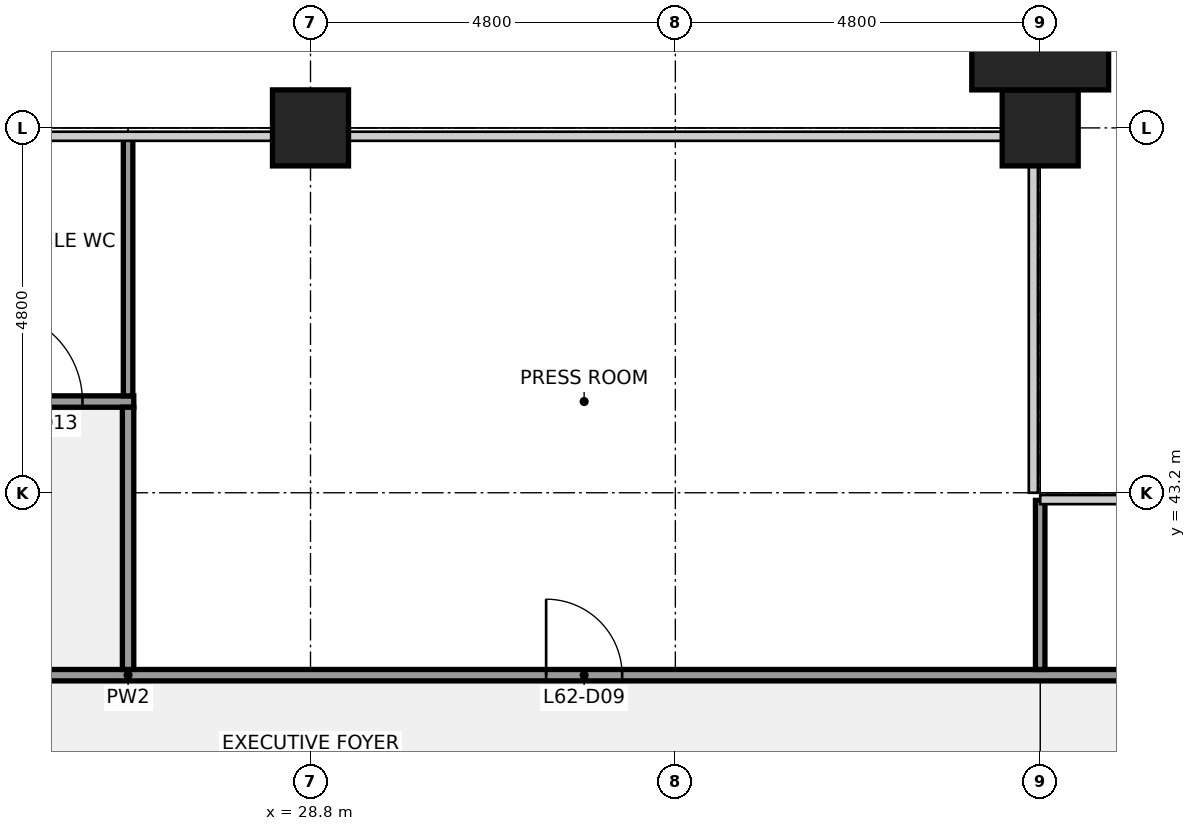
"""IFC4 building model, lengths in metres.
Left out: names, types, materials, properties, quantities, classifications, styles, units other than length and angle.
Written with IfcOpenShell. Run it as: python <this file> out.ifc"""

import sys

from ifc_helpers import new_model, si_unit, direction, frame, frame_2d, origin, origin_2d, place, context, subcontext, project, spatial, rectangle, extrude, element, fill, save


model = new_model("IFC4")
c1 = context("Model", 3, precision=1e-05, world=origin(), true_north=direction((0.0, 1.0)))
c2 = subcontext(c1, "Body", "Model", "MODEL_VIEW")
j1 = project(units=[si_unit("LENGTHUNIT", "METRE"), si_unit("PLANEANGLEUNIT", "RADIAN")], contexts=[c1])
p1 = place(None, origin())
s1 = spatial("IfcSite", under=j1, at=p1, CompositionType="ELEMENT")
p2 = place(p1, origin())
s2 = spatial("IfcBuilding", under=s1, at=p2, CompositionType="ELEMENT")
p3 = place(p2, frame((0.0, 0.0, 286.3)))
s3 = spatial("IfcBuildingStorey", under=s2, at=p3, CompositionType="ELEMENT", Elevation=286.3)
for number, where, z_axis, x_axis in (
    (1, (28.8, 48.0, 0.0), (0.0, 0.0, 1.0), (1.0, 0.0, 0.0)),
    (2, (38.4, 48.0, 0.0), (0.0, 0.0, 1.0), (1.0, 0.0, 0.0)),
):
    element("IfcColumn", number, at=place(p3, frame(where, z_axis=z_axis, x_axis=x_axis)), inside=s3, PredefinedType="COLUMN", context=c2, shape_type="SweptSolid", body=[
        extrude(rectangle(XDim=1.0, YDim=1.0, at=origin_2d()), origin(), (0.0, 0.0, 1.0), 4.0),
    ])
p4 = place(p3, frame((9.7, 40.8, 0.0), z_axis=(0.0, 0.0, 1.0), x_axis=(1.0, 0.0, 0.0)))
e3 = element("IfcWall", 3, at=p4, inside=s3, PredefinedType="PARTITIONING", context=c2, shape_type="SweptSolid", body=[
    extrude(rectangle(XDim=33.4, YDim=0.15, at=frame_2d((16.7, 0.0))), origin(), (0.0, 0.0, 1.0), 2.849),
])
p5 = place(p4, frame((4.25, 0.0, 0.0)))
e4 = element("IfcOpeningElement", 4, at=p5, cuts=e3, PredefinedType="OPENING", context=c2, shape_type="SweptSolid", body=[
    extrude(rectangle(XDim=1.0, YDim=2.1, at=frame_2d((0.5, 1.05))), frame((0.0, 0.085, 0.0), z_axis=(0.0, -1.0, 0.0), x_axis=(1.0, 0.0, 0.0)), (0.0, 0.0, 1.0), 0.17),
])
p6 = place(p4, frame((12.6, 0.0, 0.0)))
e5 = element("IfcOpeningElement", 5, at=p6, cuts=e3, PredefinedType="OPENING", context=c2, shape_type="SweptSolid", body=[
    extrude(rectangle(XDim=1.0, YDim=2.1, at=frame_2d((0.5, 1.05))), frame((0.0, 0.085, 0.0), z_axis=(0.0, -1.0, 0.0), x_axis=(1.0, 0.0, 0.0)), (0.0, 0.0, 1.0), 0.17),
])
p7 = place(p4, frame((22.2, 0.0, 0.0)))
e6 = element("IfcOpeningElement", 6, at=p7, cuts=e3, PredefinedType="OPENING", context=c2, shape_type="SweptSolid", body=[
    extrude(rectangle(XDim=1.0, YDim=2.1, at=frame_2d((0.5, 1.05))), frame((0.0, 0.085, 0.0), z_axis=(0.0, -1.0, 0.0), x_axis=(1.0, 0.0, 0.0)), (0.0, 0.0, 1.0), 0.17),
])
p8 = place(p4, frame((30.55, 0.0, 0.0)))
e7 = element("IfcOpeningElement", 7, at=p8, cuts=e3, PredefinedType="OPENING", context=c2, shape_type="SweptSolid", body=[
    extrude(rectangle(XDim=1.0, YDim=2.1, at=frame_2d((0.5, 1.05))), frame((0.0, 0.085, 0.0), z_axis=(0.0, -1.0, 0.0), x_axis=(1.0, 0.0, 0.0)), (0.0, 0.0, 1.0), 0.17),
])
p9 = place(p3, frame((19.3, 44.4, 0.0), z_axis=(0.0, 0.0, 1.0), x_axis=(1.0, 0.0, 0.0)))
e8 = element("IfcWall", 8, at=p9, inside=s3, PredefinedType="PARTITIONING", context=c2, shape_type="SweptSolid", body=[
    extrude(rectangle(XDim=7.175, YDim=0.15, at=frame_2d((3.587, 0.0))), origin(), (0.0, 0.0, 1.0), 2.849),
])
p10 = place(p9, frame((0.7, 0.0, 0.0)))
e9 = element("IfcOpeningElement", 9, at=p10, cuts=e8, PredefinedType="OPENING", context=c2, shape_type="SweptSolid", body=[
    extrude(rectangle(XDim=0.9, YDim=2.1, at=frame_2d((0.45, 1.05))), frame((0.0, 0.085, 0.0), z_axis=(0.0, -1.0, 0.0), x_axis=(1.0, 0.0, 0.0)), (0.0, 0.0, 1.0), 0.17),
])
p11 = place(p9, frame((3.05, 0.0, 0.0)))
e10 = element("IfcOpeningElement", 10, at=p11, cuts=e8, PredefinedType="OPENING", context=c2, shape_type="SweptSolid", body=[
    extrude(rectangle(XDim=0.9, YDim=2.1, at=frame_2d((0.45, 1.05))), frame((0.0, 0.085, 0.0), z_axis=(0.0, -1.0, 0.0), x_axis=(1.0, 0.0, 0.0)), (0.0, 0.0, 1.0), 0.17),
])
p12 = place(p9, frame((5.3, 0.0, 0.0)))
e11 = element("IfcOpeningElement", 11, at=p12, cuts=e8, PredefinedType="OPENING", context=c2, shape_type="SweptSolid", body=[
    extrude(rectangle(XDim=1.2, YDim=2.1, at=frame_2d((0.6, 1.05))), frame((0.0, 0.085, 0.0), z_axis=(0.0, -1.0, 0.0), x_axis=(1.0, 0.0, 0.0)), (0.0, 0.0, 1.0), 0.17),
])
p13 = place(p3, frame((26.4, 44.475, 0.0), z_axis=(0.0, 0.0, 1.0), x_axis=(0.0, 1.0, 0.0)))
e12 = element("IfcWall", 12, at=p13, inside=s3, PredefinedType="PARTITIONING", context=c2, shape_type="SweptSolid", body=[
    extrude(rectangle(XDim=3.425, YDim=0.125, at=frame_2d((1.712, 0.0))), origin(), (0.0, 0.0, 1.0), 2.849),
])
p14 = place(p3, frame((26.4, 40.875, 0.0), z_axis=(0.0, 0.0, 1.0), x_axis=(0.0, 1.0, 0.0)))
e13 = element("IfcWall", 13, at=p14, inside=s3, PredefinedType="PARTITIONING", context=c2, shape_type="SweptSolid", body=[
    extrude(rectangle(XDim=3.45, YDim=0.15, at=frame_2d((1.725, 0.0))), origin(), (0.0, 0.0, 1.0), 2.849),
])
p15 = place(p3, frame((38.4, 40.875, 0.0), z_axis=(0.0, 0.0, 1.0), x_axis=(0.0, 1.0, 0.0)))
e14 = element("IfcWall", 14, at=p15, inside=s3, PredefinedType="PARTITIONING", context=c2, shape_type="SweptSolid", body=[
    extrude(rectangle(XDim=2.225, YDim=0.125, at=frame_2d((1.113, 0.0))), origin(), (0.0, 0.0, 1.0), 2.849),
])
p16 = place(p3, frame((38.4, 49.0, 0.0), z_axis=(0.0, 0.0, 1.0), x_axis=(1.0, 0.0, 0.0)))
e15 = element("IfcColumn", 15, at=p16, inside=s3, PredefinedType="PILASTER", context=c2, shape_type="SweptSolid", body=[
    extrude(rectangle(XDim=1.8, YDim=1.0, at=origin_2d()), origin(), (0.0, 0.0, 1.0), 4.0),
])
p17 = place(p7, origin())
e16 = element("IfcDoor", 16, at=p17, inside=s3, OperationType="SINGLE_SWING_LEFT", PredefinedType="DOOR", context=c2, shape_type="SweptSolid", body=[
    extrude(rectangle(XDim=1.0, YDim=2.1, at=frame_2d((0.5, 1.05))), frame((0.0, 0.025, 0.0), z_axis=(0.0, -1.0, 0.0), x_axis=(1.0, 0.0, 0.0)), (0.0, 0.0, 1.0), 0.05),
])
fill(e6, e16)
p18 = place(p12, origin())
e17 = element("IfcDoor", 17, at=p18, inside=s3, OperationType="SINGLE_SWING_LEFT", PredefinedType="DOOR", context=c2, shape_type="SweptSolid", body=[
    extrude(rectangle(XDim=1.2, YDim=2.1, at=frame_2d((0.6, 1.05))), frame((0.0, 0.025, 0.0), z_axis=(0.0, -1.0, 0.0), x_axis=(1.0, 0.0, 0.0)), (0.0, 0.0, 1.0), 0.05),
])
fill(e11, e17)
save(model, sys.argv[1])
